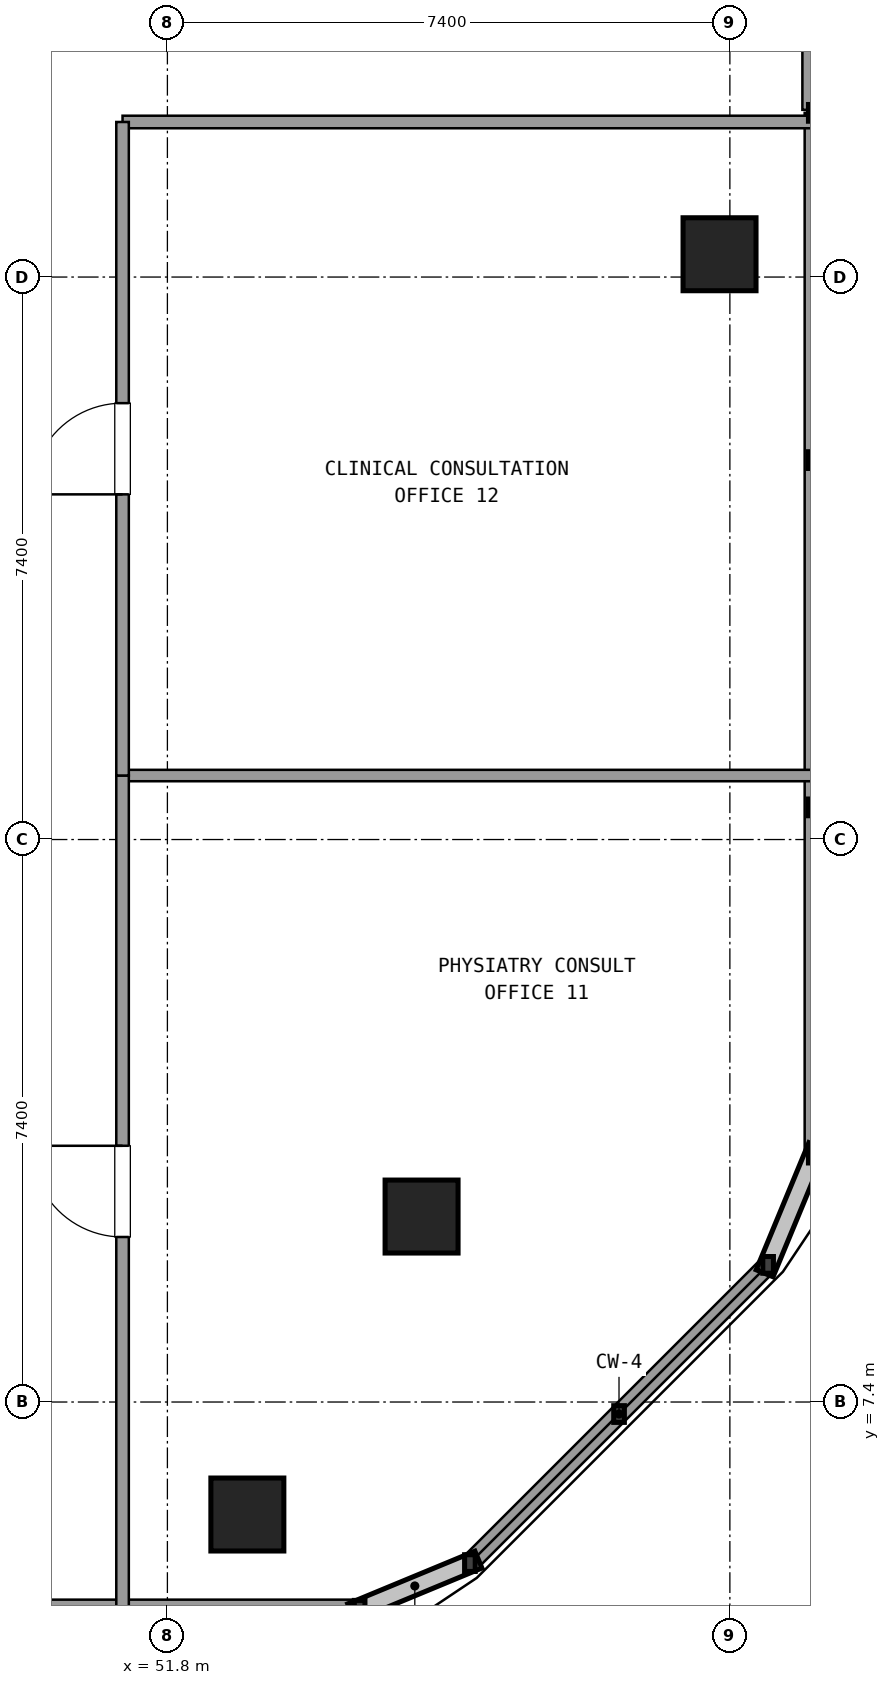
"""IFC4 building model, lengths in metres.
Left out: names, types, materials, properties, quantities, classifications, styles, units other than length and angle.
Written with IfcOpenShell. Run it as: python <this file> out.ifc"""

import sys

from ifc_helpers import new_model, si_unit, direction, frame, frame_2d, origin, origin_2d, place, context, subcontext, project, spatial, rectangle, extrude, element, fill, save


model = new_model("IFC4")
c1 = context("Model", 3, precision=1e-05, world=origin(), true_north=direction((0.0, 1.0)))
c2 = subcontext(c1, "Body", "Model", "MODEL_VIEW")
j1 = project(units=[si_unit("LENGTHUNIT", "METRE"), si_unit("PLANEANGLEUNIT", "RADIAN")], contexts=[c1])
p1 = place(None, origin())
s1 = spatial("IfcSite", under=j1, at=p1, CompositionType="ELEMENT")
p2 = place(p1, origin())
s2 = spatial("IfcBuilding", under=s1, at=p2, CompositionType="ELEMENT")
p3 = place(p2, frame((0.0, 0.0, 170.82)))
s3 = spatial("IfcBuildingStorey", under=s2, at=p3, CompositionType="ELEMENT", Elevation=170.82)
for number, where, z_axis, x_axis in (
    (1, (52.852, 5.92, 0.0), (0.0, 0.0, 1.0), (1.0, 0.0, 0.0)),
    (2, (55.144, 9.84, 0.0), (0.0, 0.0, 1.0), (1.0, 0.0, 0.0)),
    (3, (59.064, 22.5, 0.0), (0.0, 0.0, 1.0), (1.0, 0.0, 0.0)),
):
    element("IfcColumn", number, at=place(p3, frame(where, z_axis=z_axis, x_axis=x_axis)), inside=s3, PredefinedType="COLUMN", context=c2, shape_type="SweptSolid", body=[
        extrude(rectangle(XDim=0.96, YDim=0.96, at=origin_2d()), origin(), (0.0, 0.0, 1.0), 3.6),
    ])
p4 = place(p3, frame((19.671, 4.68, 0.0), z_axis=(0.0, 0.0, 1.0), x_axis=(1.0, 0.0, 0.0)))
e4 = element("IfcWall", 4, at=p4, inside=s3, PredefinedType="SOLIDWALL", context=c2, shape_type="SweptSolid", body=[
    extrude(rectangle(XDim=34.658, YDim=0.24, at=frame_2d((17.329, 0.0))), origin(), (0.0, 0.0, 1.0), 0.85),
])
p5 = place(p3, frame((55.78, 5.281, 0.0), z_axis=(0.0, 0.0, 1.0), x_axis=(0.707084777957, 0.707128783731, 0.0)))
e5 = element("IfcWall", 5, at=p5, inside=s3, PredefinedType="SOLIDWALL", context=c2, shape_type="SweptSolid", body=[
    extrude(rectangle(XDim=5.548, YDim=0.24, at=frame_2d((2.774, 0.0))), origin(), (0.0, 0.0, 1.0), 0.85),
])
p6 = place(p3, frame((60.304, 24.4, 0.0), z_axis=(0.0, 0.0, 1.0), x_axis=(0.0, 1.0, 0.0)))
e6 = element("IfcWall", 6, at=p6, inside=s3, PredefinedType="SOLIDWALL", context=c2, shape_type="SweptSolid", body=[
    extrude(rectangle(XDim=3.0, YDim=0.3, at=frame_2d((1.5, 0.0))), origin(), (0.0, 0.0, 1.0), 2.67),
])
p7 = place(p6, frame((0.9, 0.0, 0.0)))
e7 = element("IfcOpeningElement", 7, at=p7, cuts=e6, PredefinedType="OPENING", context=c2, shape_type="SweptSolid", body=[
    extrude(rectangle(XDim=1.2, YDim=2.2, at=frame_2d((0.6, 1.1))), frame((0.0, 0.16, 0.0), z_axis=(0.0, -1.0, 0.0), x_axis=(1.0, 0.0, 0.0)), (0.0, 0.0, 1.0), 0.32),
])
p8 = place(p3, frame((60.304, 10.655, 0.0), z_axis=(0.0, 0.0, 1.0), x_axis=(0.0, 1.0, 0.0)))
e8 = element("IfcWall", 8, at=p8, inside=s3, PredefinedType="SOLIDWALL", context=c2, shape_type="SweptSolid", body=[
    extrude(rectangle(XDim=13.705, YDim=0.24, at=frame_2d((6.853, 0.0))), origin(), (0.0, 0.0, 1.0), 0.85),
])
p9 = place(p3, frame((51.21, 24.24, 0.0), z_axis=(0.0, 0.0, 1.0), x_axis=(1.0, 0.0, 0.0)))
e9 = element("IfcWall", 9, at=p9, inside=s3, PredefinedType="PARTITIONING", context=c2, shape_type="SweptSolid", body=[
    extrude(rectangle(XDim=9.074, YDim=0.165, at=frame_2d((4.537, 0.0))), origin(), (0.0, 0.0, 1.0), 2.61),
])
p10 = place(p3, frame((51.21, 15.642, 0.0), z_axis=(0.0, 0.0, 1.0), x_axis=(1.0, 0.0, 0.0)))
e10 = element("IfcWall", 10, at=p10, inside=s3, PredefinedType="PARTITIONING", context=c2, shape_type="SweptSolid", body=[
    extrude(rectangle(XDim=9.074, YDim=0.15, at=frame_2d((4.537, 0.0))), origin(), (0.0, 0.0, 1.0), 2.61),
])
p11 = place(p3, frame((51.21, 4.7, 0.0), z_axis=(0.0, 0.0, 1.0), x_axis=(0.0, 1.0, 0.0)))
e11 = element("IfcWall", 11, at=p11, inside=s3, PredefinedType="PARTITIONING", context=c2, shape_type="SweptSolid", body=[
    extrude(rectangle(XDim=10.942, YDim=0.165, at=frame_2d((5.471, 0.0))), origin(), (0.0, 0.0, 1.0), 2.61),
])
p12 = place(p11, frame((4.871, 0.0, 0.0)))
e12 = element("IfcOpeningElement", 12, at=p12, cuts=e11, PredefinedType="OPENING", context=c2, shape_type="SweptSolid", body=[
    extrude(rectangle(XDim=1.2, YDim=2.15, at=frame_2d((0.6, 1.075))), frame((0.0, 0.093, 0.0), z_axis=(0.0, -1.0, 0.0), x_axis=(1.0, 0.0, 0.0)), (0.0, 0.0, 1.0), 0.185),
])
p13 = place(p3, frame((51.21, 15.642, 0.0), z_axis=(0.0, 0.0, 1.0), x_axis=(0.0, 1.0, 0.0)))
e13 = element("IfcWall", 13, at=p13, inside=s3, PredefinedType="PARTITIONING", context=c2, shape_type="SweptSolid", body=[
    extrude(rectangle(XDim=8.598, YDim=0.165, at=frame_2d((4.299, 0.0))), origin(), (0.0, 0.0, 1.0), 2.61),
])
p14 = place(p13, frame((3.699, 0.0, 0.0)))
e14 = element("IfcOpeningElement", 14, at=p14, cuts=e13, PredefinedType="OPENING", context=c2, shape_type="SweptSolid", body=[
    extrude(rectangle(XDim=1.2, YDim=2.15, at=frame_2d((0.6, 1.075))), frame((0.0, 0.093, 0.0), z_axis=(0.0, -1.0, 0.0), x_axis=(1.0, 0.0, 0.0)), (0.0, 0.0, 1.0), 0.185),
])
p15 = place(p12, origin())
e15 = element("IfcDoor", 15, at=p15, inside=s3, OperationType="SINGLE_SWING_RIGHT", PredefinedType="DOOR", context=c2, shape_type="SweptSolid", body=[
    extrude(rectangle(XDim=1.2, YDim=2.15, at=frame_2d((0.6, 1.075))), frame((0.0, 0.025, 0.0), z_axis=(0.0, -1.0, 0.0), x_axis=(1.0, 0.0, 0.0)), (0.0, 0.0, 1.0), 0.05),
])
fill(e12, e15)
p16 = place(p14, origin())
e16 = element("IfcDoor", 16, at=p16, inside=s3, OperationType="SINGLE_SWING_LEFT", PredefinedType="DOOR", context=c2, shape_type="SweptSolid", body=[
    extrude(rectangle(XDim=1.2, YDim=2.15, at=frame_2d((0.6, 1.075))), frame((0.0, 0.025, 0.0), z_axis=(0.0, -1.0, 0.0), x_axis=(1.0, 0.0, 0.0)), (0.0, 0.0, 1.0), 0.05),
])
fill(e14, e16)
save(model, sys.argv[1])
